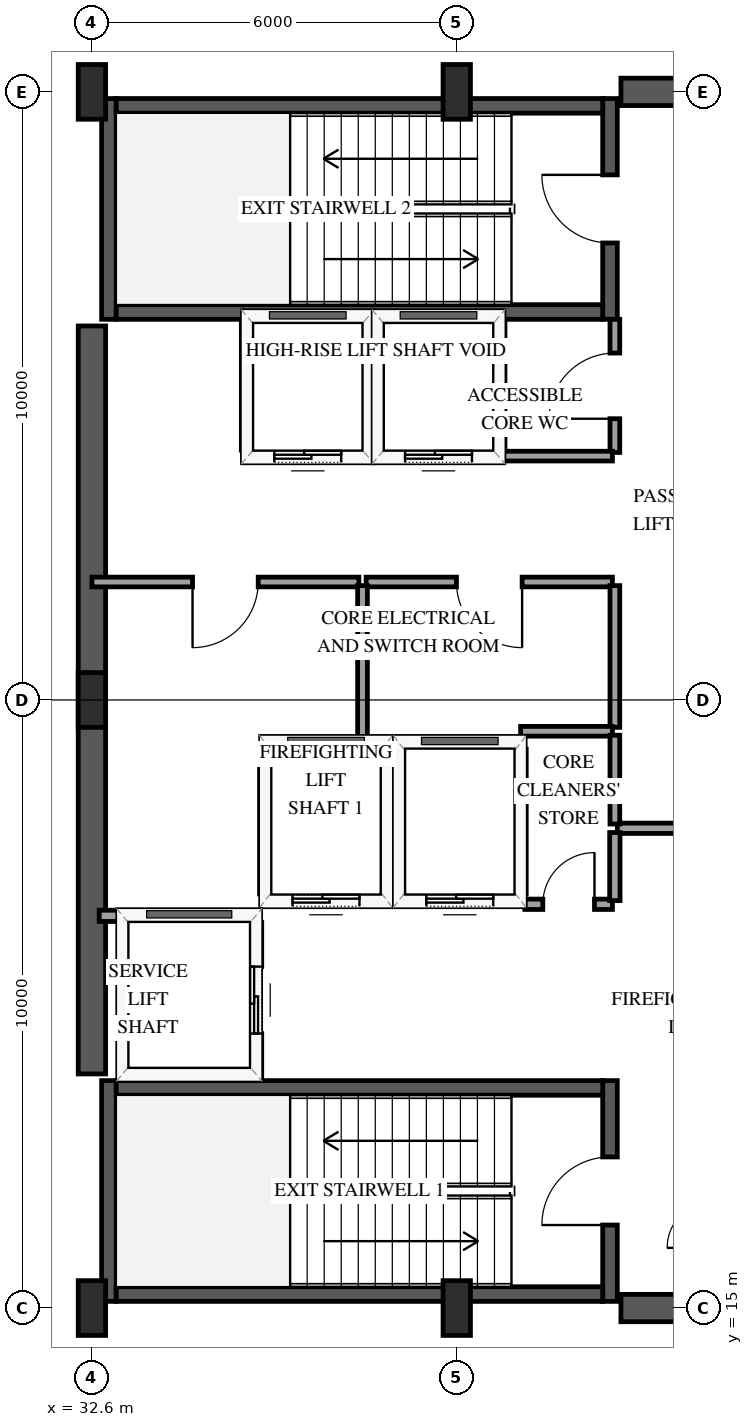
"""IFC4 building model, lengths in metres.
Left out: names, types, materials, properties, quantities, classifications, styles, units other than length and angle.
Written with IfcOpenShell. Run it as: python <this file> out.ifc"""

import sys

from ifc_helpers import new_model, si_unit, direction, frame, frame_2d, origin, origin_2d, place, context, subcontext, project, spatial, rectangle, extrude, element, fill, save


model = new_model("IFC4")
c1 = context("Model", 3, precision=1e-05, world=origin(), true_north=direction((0.0, 1.0)))
c2 = subcontext(c1, "Body", "Model", "MODEL_VIEW")
j1 = project(units=[si_unit("LENGTHUNIT", "METRE"), si_unit("PLANEANGLEUNIT", "RADIAN")], contexts=[c1])
p1 = place(None, origin())
s1 = spatial("IfcSite", under=j1, at=p1, CompositionType="ELEMENT")
p2 = place(p1, origin())
s2 = spatial("IfcBuilding", under=s1, at=p2, CompositionType="ELEMENT")
p3 = place(p2, frame((0.0, 0.0, 283.75)))
s3 = spatial("IfcBuildingStorey", under=s2, at=p3, CompositionType="ELEMENT", Elevation=283.75)
p4 = place(p3, frame((32.88, 15.11, 0.0), z_axis=(0.0, 0.0, 1.0), x_axis=(0.0, 1.0, 0.0)))
e1 = element("IfcWall", 1, at=p4, inside=s3, PredefinedType="SHEAR", context=c2, shape_type="SweptSolid", body=[
    extrude(rectangle(XDim=3.63, YDim=0.24, at=frame_2d((1.815, 0.0))), origin(), (0.0, 0.0, 1.0), 4.8),
])
p5 = place(p3, frame((41.12, 15.11, 0.0), z_axis=(0.0, 0.0, 1.0), x_axis=(0.0, 1.0, 0.0)))
e2 = element("IfcWall", 2, at=p5, inside=s3, PredefinedType="SHEAR", context=c2, shape_type="SweptSolid", body=[
    extrude(rectangle(XDim=3.63, YDim=0.24, at=frame_2d((1.815, 0.0))), origin(), (0.0, 0.0, 1.0), 4.8),
])
p6 = place(p5, frame((1.255, 0.0, 0.0)))
e3 = element("IfcOpeningElement", 3, at=p6, cuts=e2, PredefinedType="OPENING", context=c2, shape_type="SweptSolid", body=[
    extrude(rectangle(XDim=1.12, YDim=2.15, at=frame_2d((0.56, 1.075))), frame((0.0, 0.13, 0.0), z_axis=(0.0, -1.0, 0.0), x_axis=(1.0, 0.0, 0.0)), (0.0, 0.0, 1.0), 0.26),
])
for number, where, z_axis, x_axis in (
    (4, (33.0, 15.23, 0.0), (0.0, 0.0, 1.0), (1.0, 0.0, 0.0)),
    (5, (33.0, 18.62, 0.0), (0.0, 0.0, 1.0), (1.0, 0.0, 0.0)),
):
    element("IfcWall", number, at=place(p3, frame(where, z_axis=z_axis, x_axis=x_axis)), inside=s3, PredefinedType="SHEAR", context=c2, shape_type="SweptSolid", body=[
        extrude(rectangle(XDim=8.0, YDim=0.24, at=frame_2d((4.0, 0.0))), origin(), (0.0, 0.0, 1.0), 4.8),
    ])
p7 = place(p3, frame((32.88, 31.26, 0.0), z_axis=(0.0, 0.0, 1.0), x_axis=(0.0, 1.0, 0.0)))
e6 = element("IfcWall", 6, at=p7, inside=s3, PredefinedType="SHEAR", context=c2, shape_type="SweptSolid", body=[
    extrude(rectangle(XDim=3.63, YDim=0.24, at=frame_2d((1.815, 0.0))), origin(), (0.0, 0.0, 1.0), 4.8),
])
p8 = place(p3, frame((41.12, 31.26, 0.0), z_axis=(0.0, 0.0, 1.0), x_axis=(0.0, 1.0, 0.0)))
e7 = element("IfcWall", 7, at=p8, inside=s3, PredefinedType="SHEAR", context=c2, shape_type="SweptSolid", body=[
    extrude(rectangle(XDim=3.63, YDim=0.24, at=frame_2d((1.815, 0.0))), origin(), (0.0, 0.0, 1.0), 4.8),
])
p9 = place(p8, frame((1.255, 0.0, 0.0)))
e8 = element("IfcOpeningElement", 8, at=p9, cuts=e7, PredefinedType="OPENING", context=c2, shape_type="SweptSolid", body=[
    extrude(rectangle(XDim=1.12, YDim=2.15, at=frame_2d((0.56, 1.075))), frame((0.0, 0.13, 0.0), z_axis=(0.0, -1.0, 0.0), x_axis=(1.0, 0.0, 0.0)), (0.0, 0.0, 1.0), 0.26),
])
for number, where, z_axis, x_axis in (
    (9, (33.0, 31.38, 0.0), (0.0, 0.0, 1.0), (1.0, 0.0, 0.0)),
    (10, (33.0, 34.77, 0.0), (0.0, 0.0, 1.0), (1.0, 0.0, 0.0)),
):
    element("IfcWall", number, at=place(p3, frame(where, z_axis=z_axis, x_axis=x_axis)), inside=s3, PredefinedType="SHEAR", context=c2, shape_type="SweptSolid", body=[
        extrude(rectangle(XDim=8.0, YDim=0.24, at=frame_2d((4.0, 0.0))), origin(), (0.0, 0.0, 1.0), 4.8),
    ])
p10 = place(p3, frame((32.6, 18.85, 0.0), z_axis=(0.0, 0.0, 1.0), x_axis=(0.0, 1.0, 0.0)))
e11 = element("IfcWall", 11, at=p10, inside=s3, PredefinedType="SHEAR", context=c2, shape_type="SweptSolid", body=[
    extrude(rectangle(XDim=12.3, YDim=0.45, at=frame_2d((6.15, 0.0))), origin(), (0.0, 0.0, 1.0), 4.8),
])
for number, where, z_axis, x_axis in (
    (12, (41.3, 15.0, 0.0), (0.0, 0.0, 1.0), (1.0, 0.0, 0.0)),
    (13, (41.3, 35.0, 0.0), (0.0, 0.0, 1.0), (1.0, 0.0, 0.0)),
):
    element("IfcWall", number, at=place(p3, frame(where, z_axis=z_axis, x_axis=x_axis)), inside=s3, PredefinedType="SHEAR", context=c2, shape_type="SweptSolid", body=[
        extrude(rectangle(XDim=2.85, YDim=0.45, at=frame_2d((1.425, 0.0))), origin(), (0.0, 0.0, 1.0), 4.8),
    ])
for number, where, z_axis, x_axis in (
    (14, (32.6, 15.0, 0.0), (0.0, 0.0, 1.0), (1.0, 0.0, 0.0)),
    (15, (32.6, 25.0, 0.0), (0.0, 0.0, 1.0), (1.0, 0.0, 0.0)),
    (16, (32.6, 35.0, 0.0), (0.0, 0.0, 1.0), (1.0, 0.0, 0.0)),
    (17, (38.6, 15.0, 0.0), (0.0, 0.0, 1.0), (1.0, 0.0, 0.0)),
    (18, (38.6, 35.0, 0.0), (0.0, 0.0, 1.0), (1.0, 0.0, 0.0)),
):
    element("IfcColumn", number, at=place(p3, frame(where, z_axis=z_axis, x_axis=x_axis)), inside=s3, PredefinedType="PILASTER", context=c2, shape_type="SweptSolid", body=[
        extrude(rectangle(XDim=0.45, YDim=0.9, at=origin_2d()), origin(), (0.0, 0.0, 1.0), 4.8),
    ])
p11 = place(p3, frame((35.45, 21.7, 0.0), z_axis=(0.0, 0.0, 1.0), x_axis=(1.0, 0.0, 0.0)))
e19 = element("IfcWall", 19, at=p11, inside=s3, PredefinedType="SOLIDWALL", context=c2, shape_type="SweptSolid", body=[
    extrude(rectangle(XDim=2.0, YDim=0.185, at=frame_2d((1.0, 0.0))), origin(), (0.0, 0.0, 1.0), 4.5),
])
p12 = place(p11, frame((0.45, 0.0, 0.0)))
e20 = element("IfcOpeningElement", 20, at=p12, cuts=e19, PredefinedType="OPENING", context=c2, shape_type="SweptSolid", body=[
    extrude(rectangle(XDim=1.1, YDim=2.15, at=frame_2d((0.55, 1.075))), frame((0.0, 0.103, 0.0), z_axis=(0.0, -1.0, 0.0), x_axis=(1.0, 0.0, 0.0)), (0.0, 0.0, 1.0), 0.205),
])
p13 = place(p3, frame((35.45, 24.3, 0.0), z_axis=(0.0, 0.0, 1.0), x_axis=(1.0, 0.0, 0.0)))
e21 = element("IfcWall", 21, at=p13, inside=s3, PredefinedType="SOLIDWALL", context=c2, shape_type="SweptSolid", body=[
    extrude(rectangle(XDim=2.0, YDim=0.185, at=frame_2d((1.0, 0.0))), origin(), (0.0, 0.0, 1.0), 4.5),
])
for number, where, z_axis, x_axis in (
    (22, (35.45, 21.81, 0.0), (0.0, 0.0, 1.0), (0.0, 1.0, 0.0)),
    (23, (37.45, 21.81, 0.0), (0.0, 0.0, 1.0), (0.0, 1.0, 0.0)),
):
    element("IfcWall", number, at=place(p3, frame(where, z_axis=z_axis, x_axis=x_axis)), inside=s3, PredefinedType="SOLIDWALL", context=c2, shape_type="SweptSolid", body=[
        extrude(rectangle(XDim=2.38, YDim=0.185, at=frame_2d((1.19, 0.0))), origin(), (0.0, 0.0, 1.0), 4.5),
    ])
p14 = place(p3, frame((37.65, 21.7, 0.0), z_axis=(0.0, 0.0, 1.0), x_axis=(1.0, 0.0, 0.0)))
e24 = element("IfcWall", 24, at=p14, inside=s3, PredefinedType="SOLIDWALL", context=c2, shape_type="SweptSolid", body=[
    extrude(rectangle(XDim=2.0, YDim=0.185, at=frame_2d((1.0, 0.0))), origin(), (0.0, 0.0, 1.0), 4.5),
])
p15 = place(p14, frame((0.45, 0.0, 0.0)))
e25 = element("IfcOpeningElement", 25, at=p15, cuts=e24, PredefinedType="OPENING", context=c2, shape_type="SweptSolid", body=[
    extrude(rectangle(XDim=1.1, YDim=2.15, at=frame_2d((0.55, 1.075))), frame((0.0, 0.103, 0.0), z_axis=(0.0, -1.0, 0.0), x_axis=(1.0, 0.0, 0.0)), (0.0, 0.0, 1.0), 0.205),
])
p16 = place(p3, frame((37.65, 24.3, 0.0), z_axis=(0.0, 0.0, 1.0), x_axis=(1.0, 0.0, 0.0)))
e26 = element("IfcWall", 26, at=p16, inside=s3, PredefinedType="SOLIDWALL", context=c2, shape_type="SweptSolid", body=[
    extrude(rectangle(XDim=2.0, YDim=0.185, at=frame_2d((1.0, 0.0))), origin(), (0.0, 0.0, 1.0), 4.5),
])
p17 = place(p3, frame((39.65, 21.81, 0.0), z_axis=(0.0, 0.0, 1.0), x_axis=(0.0, 1.0, 0.0)))
e27 = element("IfcWall", 27, at=p17, inside=s3, PredefinedType="SOLIDWALL", context=c2, shape_type="SweptSolid", body=[
    extrude(rectangle(XDim=2.38, YDim=0.185, at=frame_2d((1.19, 0.0))), origin(), (0.0, 0.0, 1.0), 4.5),
])
p18 = place(p3, frame((32.72, 21.45, 0.0), z_axis=(0.0, 0.0, 1.0), x_axis=(1.0, 0.0, 0.0)))
e28 = element("IfcWall", 28, at=p18, inside=s3, PredefinedType="SOLIDWALL", context=c2, shape_type="SweptSolid", body=[
    extrude(rectangle(XDim=2.58, YDim=0.185, at=frame_2d((1.29, 0.0))), origin(), (0.0, 0.0, 1.0), 4.5),
])
p19 = place(p3, frame((35.3, 18.79, 0.0), z_axis=(0.0, 0.0, 1.0), x_axis=(0.0, 1.0, 0.0)))
e29 = element("IfcWall", 29, at=p19, inside=s3, PredefinedType="SOLIDWALL", context=c2, shape_type="SweptSolid", body=[
    extrude(rectangle(XDim=2.55, YDim=0.185, at=frame_2d((1.275, 0.0))), origin(), (0.0, 0.0, 1.0), 4.5),
])
p20 = place(p19, frame((0.725, 0.0, 0.0)))
e30 = element("IfcOpeningElement", 30, at=p20, cuts=e29, PredefinedType="OPENING", context=c2, shape_type="SweptSolid", body=[
    extrude(rectangle(XDim=1.1, YDim=2.15, at=frame_2d((0.55, 1.075))), frame((0.0, 0.103, 0.0), z_axis=(0.0, -1.0, 0.0), x_axis=(1.0, 0.0, 0.0)), (0.0, 0.0, 1.0), 0.205),
])
p21 = place(p3, frame((35.15, 29.0, 0.0), z_axis=(0.0, 0.0, 1.0), x_axis=(1.0, 0.0, 0.0)))
e31 = element("IfcWall", 31, at=p21, inside=s3, PredefinedType="SOLIDWALL", context=c2, shape_type="SweptSolid", body=[
    extrude(rectangle(XDim=2.0, YDim=0.185, at=frame_2d((1.0, 0.0))), origin(), (0.0, 0.0, 1.0), 4.5),
])
p22 = place(p21, frame((0.45, 0.0, 0.0)))
e32 = element("IfcOpeningElement", 32, at=p22, cuts=e31, PredefinedType="OPENING", context=c2, shape_type="SweptSolid", body=[
    extrude(rectangle(XDim=1.1, YDim=2.15, at=frame_2d((0.55, 1.075))), frame((0.0, 0.103, 0.0), z_axis=(0.0, -1.0, 0.0), x_axis=(1.0, 0.0, 0.0)), (0.0, 0.0, 1.0), 0.205),
])
for number, where, z_axis, x_axis in (
    (33, (35.15, 29.11, 0.0), (0.0, 0.0, 1.0), (0.0, 1.0, 0.0)),
    (34, (37.15, 29.11, 0.0), (0.0, 0.0, 1.0), (0.0, 1.0, 0.0)),
):
    element("IfcWall", number, at=place(p3, frame(where, z_axis=z_axis, x_axis=x_axis)), inside=s3, PredefinedType="SOLIDWALL", context=c2, shape_type="SweptSolid", body=[
        extrude(rectangle(XDim=2.1, YDim=0.185, at=frame_2d((1.05, 0.0))), origin(), (0.0, 0.0, 1.0), 4.5),
    ])
p23 = place(p3, frame((37.3, 29.0, 0.0), z_axis=(0.0, 0.0, 1.0), x_axis=(1.0, 0.0, 0.0)))
e35 = element("IfcWall", 35, at=p23, inside=s3, PredefinedType="SOLIDWALL", context=c2, shape_type="SweptSolid", body=[
    extrude(rectangle(XDim=2.0, YDim=0.185, at=frame_2d((1.0, 0.0))), origin(), (0.0, 0.0, 1.0), 4.5),
])
p24 = place(p23, frame((0.45, 0.0, 0.0)))
e36 = element("IfcOpeningElement", 36, at=p24, cuts=e35, PredefinedType="OPENING", context=c2, shape_type="SweptSolid", body=[
    extrude(rectangle(XDim=1.1, YDim=2.15, at=frame_2d((0.55, 1.075))), frame((0.0, 0.103, 0.0), z_axis=(0.0, -1.0, 0.0), x_axis=(1.0, 0.0, 0.0)), (0.0, 0.0, 1.0), 0.205),
])
p25 = place(p3, frame((39.3, 29.11, 0.0), z_axis=(0.0, 0.0, 1.0), x_axis=(0.0, 1.0, 0.0)))
e37 = element("IfcWall", 37, at=p25, inside=s3, PredefinedType="SOLIDWALL", context=c2, shape_type="SweptSolid", body=[
    extrude(rectangle(XDim=2.1, YDim=0.185, at=frame_2d((1.05, 0.0))), origin(), (0.0, 0.0, 1.0), 4.5),
])
p26 = place(p3, frame((36.99, 26.94, 0.0), z_axis=(0.0, 0.0, 1.0), x_axis=(-1.0, 0.0, 0.0)))
e38 = element("IfcWall", 38, at=p26, inside=s3, PredefinedType="PARTITIONING", context=c2, shape_type="SweptSolid", body=[
    extrude(rectangle(XDim=4.39, YDim=0.16, at=frame_2d((2.195, 0.0))), origin(), (0.0, 0.0, 1.0), 4.5),
])
p27 = place(p26, frame((1.655, 0.0, 0.0)))
e39 = element("IfcOpeningElement", 39, at=p27, cuts=e38, PredefinedType="OPENING", context=c2, shape_type="SweptSolid", body=[
    extrude(rectangle(XDim=1.08, YDim=2.15, at=frame_2d((0.54, 1.075))), frame((0.0, 0.09, 0.0), z_axis=(0.0, -1.0, 0.0), x_axis=(1.0, 0.0, 0.0)), (0.0, 0.0, 1.0), 0.18),
])
p28 = place(p3, frame((41.16, 26.94, 0.0), z_axis=(0.0, 0.0, 1.0), x_axis=(-1.0, 0.0, 0.0)))
e40 = element("IfcWall", 40, at=p28, inside=s3, PredefinedType="PARTITIONING", context=c2, shape_type="SweptSolid", body=[
    extrude(rectangle(XDim=4.05, YDim=0.16, at=frame_2d((2.025, 0.0))), origin(), (0.0, 0.0, 1.0), 4.5),
])
p29 = place(p28, frame((1.485, 0.0, 0.0)))
e41 = element("IfcOpeningElement", 41, at=p29, cuts=e40, PredefinedType="OPENING", context=c2, shape_type="SweptSolid", body=[
    extrude(rectangle(XDim=1.08, YDim=2.15, at=frame_2d((0.54, 1.075))), frame((0.0, 0.09, 0.0), z_axis=(0.0, -1.0, 0.0), x_axis=(1.0, 0.0, 0.0)), (0.0, 0.0, 1.0), 0.18),
])
p30 = place(p3, frame((41.24, 22.89, 0.0), z_axis=(0.0, 0.0, 1.0), x_axis=(1.0, 0.0, 0.0)))
e42 = element("IfcWall", 42, at=p30, inside=s3, PredefinedType="PARTITIONING", context=c2, shape_type="SweptSolid", body=[
    extrude(rectangle(XDim=3.32, YDim=0.17, at=frame_2d((1.66, 0.0))), origin(), (0.0, 0.0, 1.0), 4.5),
])
p31 = place(p30, frame((1.12, 0.0, 0.0)))
e43 = element("IfcOpeningElement", 43, at=p31, cuts=e42, PredefinedType="OPENING", context=c2, shape_type="SweptSolid", body=[
    extrude(rectangle(XDim=1.08, YDim=2.15, at=frame_2d((0.54, 1.075))), frame((0.0, 0.095, 0.0), z_axis=(0.0, -1.0, 0.0), x_axis=(1.0, 0.0, 0.0)), (0.0, 0.0, 1.0), 0.19),
])
p32 = place(p3, frame((37.05, 26.88, 0.0), z_axis=(0.0, 0.0, 1.0), x_axis=(0.0, -1.0, 0.0)))
e44 = element("IfcWall", 44, at=p32, inside=s3, PredefinedType="PARTITIONING", context=c2, shape_type="SweptSolid", body=[
    extrude(rectangle(XDim=2.58, YDim=0.16, at=frame_2d((1.29, 0.0))), origin(), (0.0, 0.0, 1.0), 4.5),
])
p33 = place(p3, frame((41.2, 24.55, 0.0), z_axis=(0.0, 0.0, 1.0), x_axis=(0.0, 1.0, 0.0)))
e45 = element("IfcWall", 45, at=p33, inside=s3, PredefinedType="PARTITIONING", context=c2, shape_type="SweptSolid", body=[
    extrude(rectangle(XDim=2.33, YDim=0.16, at=frame_2d((1.165, 0.0))), origin(), (0.0, 0.0, 1.0), 4.5),
])
p34 = place(p3, frame((41.2, 29.07, 0.0), z_axis=(0.0, 0.0, 1.0), x_axis=(0.0, 1.0, 0.0)))
e46 = element("IfcWall", 46, at=p34, inside=s3, PredefinedType="PARTITIONING", context=c2, shape_type="SweptSolid", body=[
    extrude(rectangle(XDim=2.19, YDim=0.16, at=frame_2d((1.095, 0.0))), origin(), (0.0, 0.0, 1.0), 4.5),
])
p35 = place(p34, frame((0.555, 0.0, 0.0)))
e47 = element("IfcOpeningElement", 47, at=p35, cuts=e46, PredefinedType="OPENING", context=c2, shape_type="SweptSolid", body=[
    extrude(rectangle(XDim=1.08, YDim=2.15, at=frame_2d((0.54, 1.075))), frame((0.0, 0.09, 0.0), z_axis=(0.0, -1.0, 0.0), x_axis=(1.0, 0.0, 0.0)), (0.0, 0.0, 1.0), 0.18),
])
p36 = place(p3, frame((39.3, 29.01, 0.0), z_axis=(0.0, 0.0, 1.0), x_axis=(1.0, 0.0, 0.0)))
e48 = element("IfcWall", 48, at=p36, inside=s3, PredefinedType="PARTITIONING", context=c2, shape_type="SweptSolid", body=[
    extrude(rectangle(XDim=1.86, YDim=0.16, at=frame_2d((0.93, 0.0))), origin(), (0.0, 0.0, 1.0), 4.5),
])
p37 = place(p3, frame((39.65, 24.485, 0.0), z_axis=(0.0, 0.0, 1.0), x_axis=(1.0, 0.0, 0.0)))
e49 = element("IfcWall", 49, at=p37, inside=s3, PredefinedType="PARTITIONING", context=c2, shape_type="SweptSolid", body=[
    extrude(rectangle(XDim=1.51, YDim=0.16, at=frame_2d((0.755, 0.0))), origin(), (0.0, 0.0, 1.0), 4.5),
])
p38 = place(p3, frame((41.2, 22.96, 0.0), z_axis=(0.0, 0.0, 1.0), x_axis=(0.0, 1.0, 0.0)))
e50 = element("IfcWall", 50, at=p38, inside=s3, PredefinedType="PARTITIONING", context=c2, shape_type="SweptSolid", body=[
    extrude(rectangle(XDim=1.46, YDim=0.16, at=frame_2d((0.73, 0.0))), origin(), (0.0, 0.0, 1.0), 4.5),
])
p39 = place(p3, frame((39.72, 21.64, 0.0), z_axis=(0.0, 0.0, 1.0), x_axis=(1.0, 0.0, 0.0)))
e51 = element("IfcWall", 51, at=p39, inside=s3, PredefinedType="PARTITIONING", context=c2, shape_type="SweptSolid", body=[
    extrude(rectangle(XDim=1.44, YDim=0.17, at=frame_2d((0.72, 0.0))), origin(), (0.0, 0.0, 1.0), 4.5),
])
p40 = place(p39, frame((0.295, 0.0, 0.0)))
e52 = element("IfcOpeningElement", 52, at=p40, cuts=e51, PredefinedType="OPENING", context=c2, shape_type="SweptSolid", body=[
    extrude(rectangle(XDim=0.85, YDim=2.1, at=frame_2d((0.425, 1.05))), frame((0.0, 0.095, 0.0), z_axis=(0.0, -1.0, 0.0), x_axis=(1.0, 0.0, 0.0)), (0.0, 0.0, 1.0), 0.19),
])
p41 = place(p3, frame((41.2, 21.7, 0.0), z_axis=(0.0, 0.0, 1.0), x_axis=(0.0, 1.0, 0.0)))
e53 = element("IfcWall", 53, at=p41, inside=s3, PredefinedType="PARTITIONING", context=c2, shape_type="SweptSolid", body=[
    extrude(rectangle(XDim=1.12, YDim=0.17, at=frame_2d((0.56, 0.0))), origin(), (0.0, 0.0, 1.0), 4.5),
])
p42 = place(p12, origin())
e54 = element("IfcDoor", 54, at=p42, inside=s3, OperationType="SLIDING_TO_LEFT", PredefinedType="DOOR", context=c2, shape_type="SweptSolid", body=[
    extrude(rectangle(XDim=1.1, YDim=2.15, at=frame_2d((0.55, 1.075))), frame((0.0, 0.025, 0.0), z_axis=(0.0, -1.0, 0.0), x_axis=(1.0, 0.0, 0.0)), (0.0, 0.0, 1.0), 0.05),
])
fill(e20, e54)
p43 = place(p15, origin())
e55 = element("IfcDoor", 55, at=p43, inside=s3, OperationType="SLIDING_TO_LEFT", PredefinedType="DOOR", context=c2, shape_type="SweptSolid", body=[
    extrude(rectangle(XDim=1.1, YDim=2.15, at=frame_2d((0.55, 1.075))), frame((0.0, 0.025, 0.0), z_axis=(0.0, -1.0, 0.0), x_axis=(1.0, 0.0, 0.0)), (0.0, 0.0, 1.0), 0.05),
])
fill(e25, e55)
p44 = place(p20, origin())
e56 = element("IfcDoor", 56, at=p44, inside=s3, OperationType="SLIDING_TO_LEFT", PredefinedType="DOOR", context=c2, shape_type="SweptSolid", body=[
    extrude(rectangle(XDim=1.1, YDim=2.15, at=frame_2d((0.55, 1.075))), frame((0.0, 0.025, 0.0), z_axis=(0.0, -1.0, 0.0), x_axis=(1.0, 0.0, 0.0)), (0.0, 0.0, 1.0), 0.05),
])
fill(e30, e56)
p45 = place(p22, origin())
e57 = element("IfcDoor", 57, at=p45, inside=s3, OperationType="SLIDING_TO_LEFT", PredefinedType="DOOR", context=c2, shape_type="SweptSolid", body=[
    extrude(rectangle(XDim=1.1, YDim=2.15, at=frame_2d((0.55, 1.075))), frame((0.0, 0.025, 0.0), z_axis=(0.0, -1.0, 0.0), x_axis=(1.0, 0.0, 0.0)), (0.0, 0.0, 1.0), 0.05),
])
fill(e32, e57)
p46 = place(p24, origin())
e58 = element("IfcDoor", 58, at=p46, inside=s3, OperationType="SLIDING_TO_LEFT", PredefinedType="DOOR", context=c2, shape_type="SweptSolid", body=[
    extrude(rectangle(XDim=1.1, YDim=2.15, at=frame_2d((0.55, 1.075))), frame((0.0, 0.025, 0.0), z_axis=(0.0, -1.0, 0.0), x_axis=(1.0, 0.0, 0.0)), (0.0, 0.0, 1.0), 0.05),
])
fill(e36, e58)
p47 = place(p6, origin())
e59 = element("IfcDoor", 59, at=p47, inside=s3, OperationType="SINGLE_SWING_LEFT", PredefinedType="DOOR", context=c2, shape_type="SweptSolid", body=[
    extrude(rectangle(XDim=1.12, YDim=2.15, at=frame_2d((0.56, 1.075))), frame((0.0, 0.025, 0.0), z_axis=(0.0, -1.0, 0.0), x_axis=(1.0, 0.0, 0.0)), (0.0, 0.0, 1.0), 0.05),
])
fill(e3, e59)
p48 = place(p9, origin())
e60 = element("IfcDoor", 60, at=p48, inside=s3, OperationType="SINGLE_SWING_RIGHT", PredefinedType="DOOR", context=c2, shape_type="SweptSolid", body=[
    extrude(rectangle(XDim=1.12, YDim=2.15, at=frame_2d((0.56, 1.075))), frame((0.0, 0.025, 0.0), z_axis=(0.0, -1.0, 0.0), x_axis=(1.0, 0.0, 0.0)), (0.0, 0.0, 1.0), 0.05),
])
fill(e8, e60)
p49 = place(p27, origin())
e61 = element("IfcDoor", 61, at=p49, inside=s3, OperationType="SINGLE_SWING_RIGHT", PredefinedType="DOOR", context=c2, shape_type="SweptSolid", body=[
    extrude(rectangle(XDim=1.08, YDim=2.15, at=frame_2d((0.54, 1.075))), frame((0.0, 0.025, 0.0), z_axis=(0.0, -1.0, 0.0), x_axis=(1.0, 0.0, 0.0)), (0.0, 0.0, 1.0), 0.05),
])
fill(e39, e61)
p50 = place(p29, origin())
e62 = element("IfcDoor", 62, at=p50, inside=s3, OperationType="SINGLE_SWING_LEFT", PredefinedType="DOOR", context=c2, shape_type="SweptSolid", body=[
    extrude(rectangle(XDim=1.08, YDim=2.15, at=frame_2d((0.54, 1.075))), frame((0.0, 0.025, 0.0), z_axis=(0.0, -1.0, 0.0), x_axis=(1.0, 0.0, 0.0)), (0.0, 0.0, 1.0), 0.05),
])
fill(e41, e62)
p51 = place(p35, origin())
e63 = element("IfcDoor", 63, at=p51, inside=s3, OperationType="SINGLE_SWING_LEFT", PredefinedType="DOOR", context=c2, shape_type="SweptSolid", body=[
    extrude(rectangle(XDim=1.08, YDim=2.15, at=frame_2d((0.54, 1.075))), frame((0.0, 0.025, 0.0), z_axis=(0.0, -1.0, 0.0), x_axis=(1.0, 0.0, 0.0)), (0.0, 0.0, 1.0), 0.05),
])
fill(e47, e63)
p52 = place(p40, origin())
e64 = element("IfcDoor", 64, at=p52, inside=s3, OperationType="SINGLE_SWING_RIGHT", PredefinedType="DOOR", context=c2, shape_type="SweptSolid", body=[
    extrude(rectangle(XDim=0.85, YDim=2.1, at=frame_2d((0.425, 1.05))), frame((0.0, 0.025, 0.0), z_axis=(0.0, -1.0, 0.0), x_axis=(1.0, 0.0, 0.0)), (0.0, 0.0, 1.0), 0.05),
])
fill(e52, e64)
save(model, sys.argv[1])
